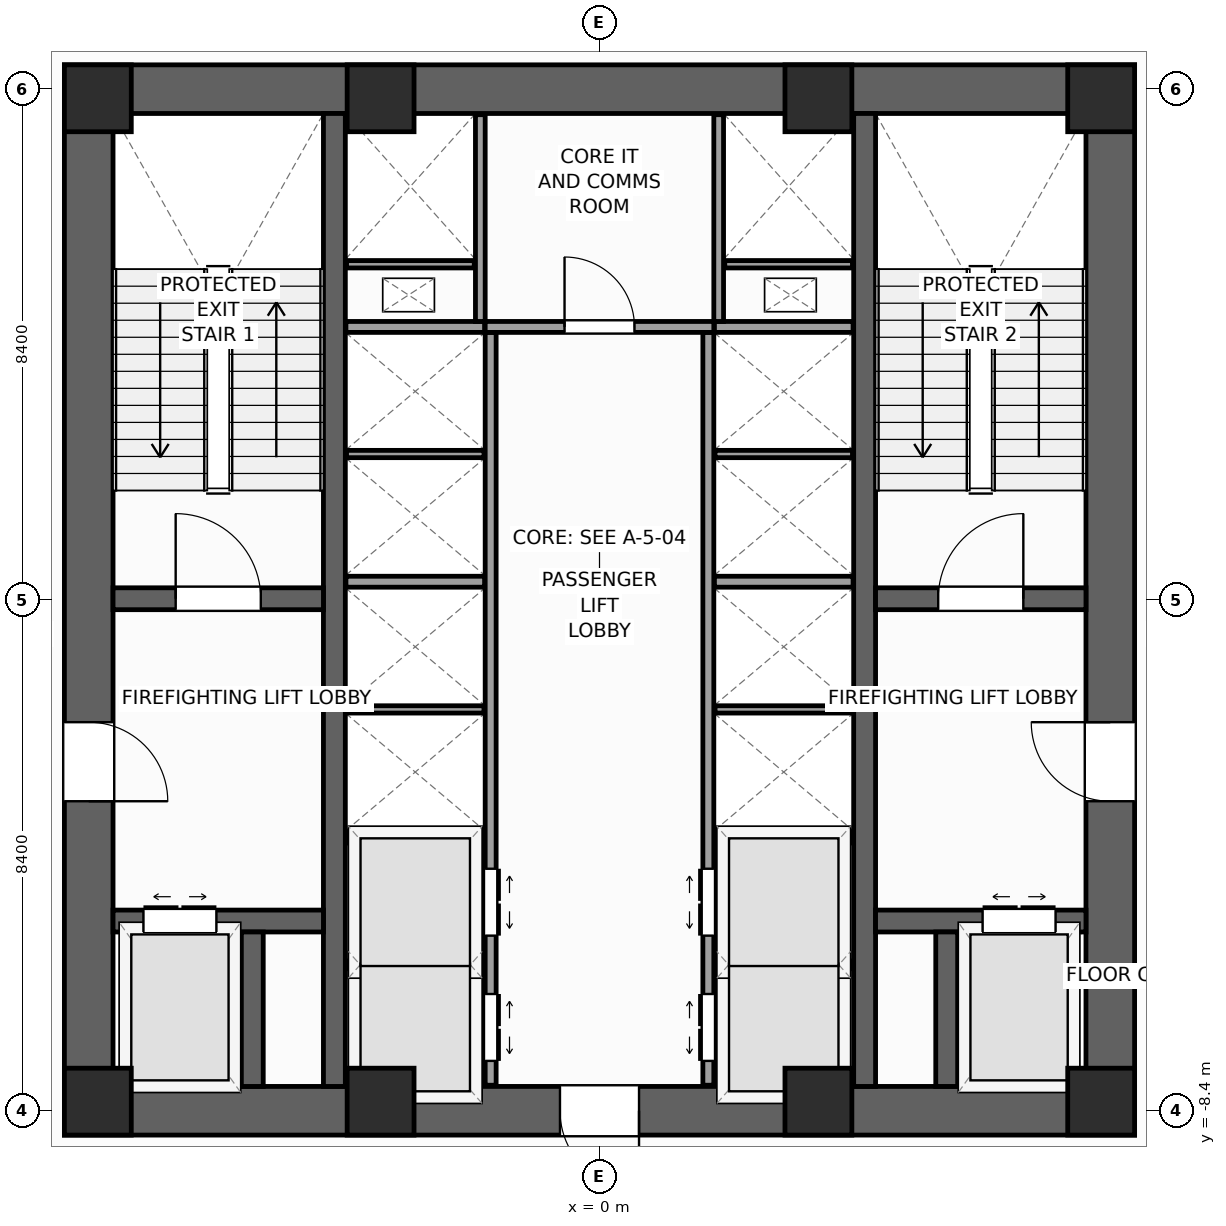
"""IFC4 building model, lengths in metres.
Left out: names, types, materials, properties, quantities, classifications, styles, units other than length and angle.
Written with IfcOpenShell. Run it as: python <this file> out.ifc"""

import sys

from ifc_helpers import new_model, si_unit, direction, frame, frame_2d, origin, origin_2d, place, context, subcontext, project, spatial, rectangle, extrude, source, transform, mapped, element, fill, save


model = new_model("IFC4")
c1 = context("Model", 3, precision=1e-05, world=origin(), true_north=direction((0.0, 1.0)))
c2 = subcontext(c1, "Body", "Model", "MODEL_VIEW")
j1 = project(units=[si_unit("LENGTHUNIT", "METRE"), si_unit("PLANEANGLEUNIT", "RADIAN")], contexts=[c1])
p1 = place(None, origin())
s1 = spatial("IfcSite", under=j1, at=p1, CompositionType="ELEMENT")
p2 = place(p1, origin())
s2 = spatial("IfcBuilding", under=s1, at=p2, CompositionType="ELEMENT")
p3 = place(p2, frame((0.0, 0.0, 6.0)))
s3 = spatial("IfcBuildingStorey", under=s2, at=p3, CompositionType="ELEMENT", Elevation=6.0)
p4 = place(p3, frame((-8.8, -8.4, 0.0), z_axis=(0.0, 0.0, 1.0), x_axis=(1.0, 0.0, 0.0)))
e1 = element("IfcWall", 1, at=p4, inside=s3, PredefinedType="SHEAR", context=c2, shape_type="SweptSolid", body=[
    extrude(rectangle(XDim=17.6, YDim=0.8, at=frame_2d((8.8, 0.0))), origin(), (0.0, 0.0, 1.0), 5.0),
])
p5 = place(p4, frame((8.15, 0.0, 0.0)))
e2 = element("IfcOpeningElement", 2, at=p5, cuts=e1, PredefinedType="OPENING", context=c2, shape_type="SweptSolid", body=[
    extrude(rectangle(XDim=1.3, YDim=2.2, at=frame_2d((0.65, 1.1))), frame((0.0, 0.41, 0.0), z_axis=(0.0, -1.0, 0.0), x_axis=(1.0, 0.0, 0.0)), (0.0, 0.0, 1.0), 0.82),
])
p6 = place(p3, frame((-8.8, 8.4, 0.0), z_axis=(0.0, 0.0, 1.0), x_axis=(1.0, 0.0, 0.0)))
e3 = element("IfcWall", 3, at=p6, inside=s3, PredefinedType="SHEAR", context=c2, shape_type="SweptSolid", body=[
    extrude(rectangle(XDim=17.6, YDim=0.8, at=frame_2d((8.8, 0.0))), origin(), (0.0, 0.0, 1.0), 5.0),
])
p7 = place(p3, frame((-8.4, -8.0, 0.0), z_axis=(0.0, 0.0, 1.0), x_axis=(0.0, 1.0, 0.0)))
e4 = element("IfcWall", 4, at=p7, inside=s3, PredefinedType="SHEAR", context=c2, shape_type="SweptSolid", body=[
    extrude(rectangle(XDim=16.0, YDim=0.8, at=frame_2d((8.0, 0.0))), origin(), (0.0, 0.0, 1.0), 5.0),
])
p8 = place(p7, frame((4.69, 0.0, 0.0)))
e5 = element("IfcOpeningElement", 5, at=p8, cuts=e4, PredefinedType="OPENING", context=c2, shape_type="SweptSolid", body=[
    extrude(rectangle(XDim=1.3, YDim=2.2, at=frame_2d((0.65, 1.1))), frame((0.0, 0.41, 0.0), z_axis=(0.0, -1.0, 0.0), x_axis=(1.0, 0.0, 0.0)), (0.0, 0.0, 1.0), 0.82),
])
p9 = place(p3, frame((8.4, -8.0, 0.0), z_axis=(0.0, 0.0, 1.0), x_axis=(0.0, 1.0, 0.0)))
e6 = element("IfcWall", 6, at=p9, inside=s3, PredefinedType="SHEAR", context=c2, shape_type="SweptSolid", body=[
    extrude(rectangle(XDim=16.0, YDim=0.8, at=frame_2d((8.0, 0.0))), origin(), (0.0, 0.0, 1.0), 5.0),
])
p10 = place(p9, frame((4.69, 0.0, 0.0)))
e7 = element("IfcOpeningElement", 7, at=p10, cuts=e6, PredefinedType="OPENING", context=c2, shape_type="SweptSolid", body=[
    extrude(rectangle(XDim=1.3, YDim=2.2, at=frame_2d((0.65, 1.1))), frame((0.0, 0.41, 0.0), z_axis=(0.0, -1.0, 0.0), x_axis=(1.0, 0.0, 0.0)), (0.0, 0.0, 1.0), 0.82),
])
for number, where, z_axis, x_axis in (
    (8, (-4.36, -8.0, 0.0), (0.0, 0.0, 1.0), (0.0, 1.0, 0.0)),
    (9, (4.36, -8.0, 0.0), (0.0, 0.0, 1.0), (0.0, 1.0, 0.0)),
):
    element("IfcWall", number, at=place(p3, frame(where, z_axis=z_axis, x_axis=x_axis)), inside=s3, PredefinedType="SHEAR", context=c2, shape_type="SweptSolid", body=[
        extrude(rectangle(XDim=16.0, YDim=0.36, at=frame_2d((8.0, 0.0))), origin(), (0.0, 0.0, 1.0), 5.0),
    ])
p11 = place(p3, frame((-8.0, 0.02, 0.0), z_axis=(0.0, 0.0, 1.0), x_axis=(1.0, 0.0, 0.0)))
e10 = element("IfcWall", 10, at=p11, inside=s3, PredefinedType="SHEAR", context=c2, shape_type="SweptSolid", body=[
    extrude(rectangle(XDim=3.46, YDim=0.36, at=frame_2d((1.73, 0.0))), origin(), (0.0, 0.0, 1.0), 5.0),
])
p12 = place(p11, frame((1.03, 0.0, 0.0)))
e11 = element("IfcOpeningElement", 11, at=p12, cuts=e10, PredefinedType="OPENING", context=c2, shape_type="SweptSolid", body=[
    extrude(rectangle(XDim=1.4, YDim=2.2, at=frame_2d((0.7, 1.1))), frame((0.0, 0.19, 0.0), z_axis=(0.0, -1.0, 0.0), x_axis=(1.0, 0.0, 0.0)), (0.0, 0.0, 1.0), 0.38),
])
p13 = place(p3, frame((4.54, 0.02, 0.0), z_axis=(0.0, 0.0, 1.0), x_axis=(1.0, 0.0, 0.0)))
e12 = element("IfcWall", 12, at=p13, inside=s3, PredefinedType="SHEAR", context=c2, shape_type="SweptSolid", body=[
    extrude(rectangle(XDim=3.46, YDim=0.36, at=frame_2d((1.73, 0.0))), origin(), (0.0, 0.0, 1.0), 5.0),
])
p14 = place(p13, frame((1.03, 0.0, 0.0)))
e13 = element("IfcOpeningElement", 13, at=p14, cuts=e12, PredefinedType="OPENING", context=c2, shape_type="SweptSolid", body=[
    extrude(rectangle(XDim=1.4, YDim=2.2, at=frame_2d((0.7, 1.1))), frame((0.0, 0.19, 0.0), z_axis=(0.0, -1.0, 0.0), x_axis=(1.0, 0.0, 0.0)), (0.0, 0.0, 1.0), 0.38),
])
p15 = place(p3, frame((-8.0, -5.28, 0.0), z_axis=(0.0, 0.0, 1.0), x_axis=(1.0, 0.0, 0.0)))
e14 = element("IfcWall", 14, at=p15, inside=s3, PredefinedType="SHEAR", context=c2, shape_type="SweptSolid", body=[
    extrude(rectangle(XDim=3.46, YDim=0.36, at=frame_2d((1.73, 0.0))), origin(), (0.0, 0.0, 1.0), 5.0),
])
p16 = place(p15, frame((0.5, 0.0, 0.0)))
e15 = element("IfcOpeningElement", 15, at=p16, cuts=e14, PredefinedType="OPENING", context=c2, shape_type="SweptSolid", body=[
    extrude(rectangle(XDim=1.2, YDim=2.25, at=frame_2d((0.6, 1.125))), frame((0.0, 0.19, 0.0), z_axis=(0.0, -1.0, 0.0), x_axis=(1.0, 0.0, 0.0)), (0.0, 0.0, 1.0), 0.38),
])
p17 = place(p3, frame((4.54, -5.28, 0.0), z_axis=(0.0, 0.0, 1.0), x_axis=(1.0, 0.0, 0.0)))
e16 = element("IfcWall", 16, at=p17, inside=s3, PredefinedType="SHEAR", context=c2, shape_type="SweptSolid", body=[
    extrude(rectangle(XDim=3.46, YDim=0.36, at=frame_2d((1.73, 0.0))), origin(), (0.0, 0.0, 1.0), 5.0),
])
p18 = place(p17, frame((1.76, 0.0, 0.0)))
e17 = element("IfcOpeningElement", 17, at=p18, cuts=e16, PredefinedType="OPENING", context=c2, shape_type="SweptSolid", body=[
    extrude(rectangle(XDim=1.2, YDim=2.25, at=frame_2d((0.6, 1.125))), frame((0.0, 0.19, 0.0), z_axis=(0.0, -1.0, 0.0), x_axis=(1.0, 0.0, 0.0)), (0.0, 0.0, 1.0), 0.38),
])
for number, where, z_axis, x_axis in (
    (18, (-5.71, -8.0, 0.0), (0.0, 0.0, 1.0), (0.0, 1.0, 0.0)),
    (19, (5.71, -8.0, 0.0), (0.0, 0.0, 1.0), (0.0, 1.0, 0.0)),
):
    element("IfcWall", number, at=place(p3, frame(where, z_axis=z_axis, x_axis=x_axis)), inside=s3, PredefinedType="SHEAR", context=c2, shape_type="SweptSolid", body=[
        extrude(rectangle(XDim=2.54, YDim=0.36, at=frame_2d((1.27, 0.0))), origin(), (0.0, 0.0, 1.0), 5.0),
    ])
m1 = source(origin(), c2, "Body", "SweptSolid", [
    extrude(rectangle(XDim=1.1, YDim=1.1, at=origin_2d()), origin(), (0.0, 0.0, 1.0), 5.0),
])
for number, where, z_axis, x_axis in (
    (20, (-8.25, -8.25, 0.0), (0.0, 0.0, 1.0), (1.0, 0.0, 0.0)),
    (21, (8.25, -8.25, 0.0), (0.0, 0.0, 1.0), (1.0, 0.0, 0.0)),
    (22, (8.25, 8.25, 0.0), (0.0, 0.0, 1.0), (1.0, 0.0, 0.0)),
    (23, (-8.25, 8.25, 0.0), (0.0, 0.0, 1.0), (1.0, 0.0, 0.0)),
    (24, (-3.6, -8.25, 0.0), (0.0, 0.0, 1.0), (1.0, 0.0, 0.0)),
    (25, (3.6, -8.25, 0.0), (0.0, 0.0, 1.0), (1.0, 0.0, 0.0)),
    (26, (-3.6, 8.25, 0.0), (0.0, 0.0, 1.0), (1.0, 0.0, 0.0)),
    (27, (3.6, 8.25, 0.0), (0.0, 0.0, 1.0), (1.0, 0.0, 0.0)),
):
    element("IfcColumn", number, at=place(p3, frame(where, z_axis=z_axis, x_axis=x_axis)), inside=s3, PredefinedType="PILASTER", context=c2, shape_type="MappedRepresentation", body=[
        mapped(m1, transform((0.0, 0.0, 0.0), scale=1.0)),
    ])
p19 = place(p3, frame((-1.79, -7.98, 0.0), z_axis=(0.0, 0.0, 1.0), x_axis=(0.0, 1.0, 0.0)))
e28 = element("IfcWall", 28, at=p19, inside=s3, PredefinedType="PARTITIONING", context=c2, shape_type="SweptSolid", body=[
    extrude(rectangle(XDim=12.38, YDim=0.18, at=frame_2d((6.19, 0.0))), origin(), (0.0, 0.0, 1.0), 4.66),
])
p20 = place(p19, frame((0.4, 0.0, 0.0)))
e29 = element("IfcOpeningElement", 29, at=p20, cuts=e28, PredefinedType="OPENING", context=c2, shape_type="SweptSolid", body=[
    extrude(rectangle(XDim=1.1, YDim=2.2, at=frame_2d((0.55, 1.1))), frame((0.0, 0.1, 0.0), z_axis=(0.0, -1.0, 0.0), x_axis=(1.0, 0.0, 0.0)), (0.0, 0.0, 1.0), 0.2),
])
p21 = place(p19, frame((2.46, 0.0, 0.0)))
e30 = element("IfcOpeningElement", 30, at=p21, cuts=e28, PredefinedType="OPENING", context=c2, shape_type="SweptSolid", body=[
    extrude(rectangle(XDim=1.1, YDim=2.2, at=frame_2d((0.55, 1.1))), frame((0.0, 0.1, 0.0), z_axis=(0.0, -1.0, 0.0), x_axis=(1.0, 0.0, 0.0)), (0.0, 0.0, 1.0), 0.2),
])
p22 = place(p3, frame((1.79, -7.98, 0.0), z_axis=(0.0, 0.0, 1.0), x_axis=(0.0, 1.0, 0.0)))
e31 = element("IfcWall", 31, at=p22, inside=s3, PredefinedType="PARTITIONING", context=c2, shape_type="SweptSolid", body=[
    extrude(rectangle(XDim=12.38, YDim=0.18, at=frame_2d((6.19, 0.0))), origin(), (0.0, 0.0, 1.0), 4.66),
])
p23 = place(p22, frame((0.4, 0.0, 0.0)))
e32 = element("IfcOpeningElement", 32, at=p23, cuts=e31, PredefinedType="OPENING", context=c2, shape_type="SweptSolid", body=[
    extrude(rectangle(XDim=1.1, YDim=2.2, at=frame_2d((0.55, 1.1))), frame((0.0, 0.1, 0.0), z_axis=(0.0, -1.0, 0.0), x_axis=(1.0, 0.0, 0.0)), (0.0, 0.0, 1.0), 0.2),
])
p24 = place(p22, frame((2.46, 0.0, 0.0)))
e33 = element("IfcOpeningElement", 33, at=p24, cuts=e31, PredefinedType="OPENING", context=c2, shape_type="SweptSolid", body=[
    extrude(rectangle(XDim=1.1, YDim=2.2, at=frame_2d((0.55, 1.1))), frame((0.0, 0.1, 0.0), z_axis=(0.0, -1.0, 0.0), x_axis=(1.0, 0.0, 0.0)), (0.0, 0.0, 1.0), 0.2),
])
p25 = place(p3, frame((-1.88, 4.49, 0.0), z_axis=(0.0, 0.0, 1.0), x_axis=(1.0, 0.0, 0.0)))
e34 = element("IfcWall", 34, at=p25, inside=s3, PredefinedType="PARTITIONING", context=c2, shape_type="SweptSolid", body=[
    extrude(rectangle(XDim=3.76, YDim=0.18, at=frame_2d((1.88, 0.0))), origin(), (0.0, 0.0, 1.0), 4.66),
])
p26 = place(p25, frame((1.305, 0.0, 0.0)))
e35 = element("IfcOpeningElement", 35, at=p26, cuts=e34, PredefinedType="OPENING", context=c2, shape_type="SweptSolid", body=[
    extrude(rectangle(XDim=1.15, YDim=2.25, at=frame_2d((0.575, 1.125))), frame((0.0, 0.1, 0.0), z_axis=(0.0, -1.0, 0.0), x_axis=(1.0, 0.0, 0.0)), (0.0, 0.0, 1.0), 0.2),
])
for number, where, z_axis, x_axis in (
    (36, (-4.17, -3.9, 0.0), (0.0, 0.0, 1.0), (1.0, 0.0, 0.0)),
    (37, (1.89, -3.9, 0.0), (0.0, 0.0, 1.0), (1.0, 0.0, 0.0)),
    (38, (-4.17, 0.3, 0.0), (0.0, 0.0, 1.0), (1.0, 0.0, 0.0)),
    (39, (1.89, 0.3, 0.0), (0.0, 0.0, 1.0), (1.0, 0.0, 0.0)),
    (40, (-4.17, 4.49, 0.0), (0.0, 0.0, 1.0), (1.0, 0.0, 0.0)),
    (41, (1.89, 4.49, 0.0), (0.0, 0.0, 1.0), (1.0, 0.0, 0.0)),
):
    element("IfcWall", number, at=place(p3, frame(where, z_axis=z_axis, x_axis=x_axis)), inside=s3, PredefinedType="PARTITIONING", context=c2, shape_type="SweptSolid", body=[
        extrude(rectangle(XDim=2.28, YDim=0.18, at=frame_2d((1.14, 0.0))), origin(), (0.0, 0.0, 1.0), 4.66),
    ])
for number, where, z_axis, x_axis in (
    (42, (-4.16, -6.0, 0.0), (0.0, 0.0, 1.0), (1.0, 0.0, 0.0)),
    (43, (1.9, -6.0, 0.0), (0.0, 0.0, 1.0), (1.0, 0.0, 0.0)),
    (44, (-4.16, -1.8, 0.0), (0.0, 0.0, 1.0), (1.0, 0.0, 0.0)),
    (45, (1.9, -1.8, 0.0), (0.0, 0.0, 1.0), (1.0, 0.0, 0.0)),
    (46, (-4.16, 2.4, 0.0), (0.0, 0.0, 1.0), (1.0, 0.0, 0.0)),
    (47, (1.9, 2.4, 0.0), (0.0, 0.0, 1.0), (1.0, 0.0, 0.0)),
):
    element("IfcWall", number, at=place(p3, frame(where, z_axis=z_axis, x_axis=x_axis)), inside=s3, PredefinedType="PARTITIONING", context=c2, shape_type="SweptSolid", body=[
        extrude(rectangle(XDim=2.26, YDim=0.12, at=frame_2d((1.13, 0.0))), origin(), (0.0, 0.0, 1.0), 4.66),
    ])
for number, where, z_axis, x_axis in (
    (48, (-1.96, 4.58, 0.0), (0.0, 0.0, 1.0), (0.0, 1.0, 0.0)),
    (49, (1.96, 4.58, 0.0), (0.0, 0.0, 1.0), (0.0, 1.0, 0.0)),
):
    element("IfcWall", number, at=place(p3, frame(where, z_axis=z_axis, x_axis=x_axis)), inside=s3, PredefinedType="PARTITIONING", context=c2, shape_type="SweptSolid", body=[
        extrude(rectangle(XDim=3.4, YDim=0.16, at=frame_2d((1.7, 0.0))), origin(), (0.0, 0.0, 1.0), 4.66),
    ])
for number, where, z_axis, x_axis in (
    (50, (-4.16, 5.52, 0.0), (0.0, 0.0, 1.0), (1.0, 0.0, 0.0)),
    (51, (2.06, 5.52, 0.0), (0.0, 0.0, 1.0), (1.0, 0.0, 0.0)),
):
    element("IfcWall", number, at=place(p3, frame(where, z_axis=z_axis, x_axis=x_axis)), inside=s3, PredefinedType="PARTITIONING", context=c2, shape_type="SweptSolid", body=[
        extrude(rectangle(XDim=2.1, YDim=0.12, at=frame_2d((1.05, 0.0))), origin(), (0.0, 0.0, 1.0), 4.66),
    ])
m2 = source(origin(), c2, "Body", "SweptSolid", [
    extrude(rectangle(XDim=1.4, YDim=2.2, at=frame_2d((0.7, 1.1))), frame((0.0, 0.025, 0.0), z_axis=(0.0, -1.0, 0.0), x_axis=(1.0, 0.0, 0.0)), (0.0, 0.0, 1.0), 0.05),
])
p27 = place(p12, origin())
e52 = element("IfcDoor", 52, at=p27, inside=s3, OperationType="SINGLE_SWING_LEFT", PredefinedType="DOOR", context=c2, shape_type="MappedRepresentation", body=[
    mapped(m2, transform((0.0, 0.0, 0.0), scale=1.0)),
])
fill(e11, e52)
p28 = place(p14, origin())
e53 = element("IfcDoor", 53, at=p28, inside=s3, OperationType="SINGLE_SWING_RIGHT", PredefinedType="DOOR", context=c2, shape_type="MappedRepresentation", body=[
    mapped(m2, transform((0.0, 0.0, 0.0), scale=1.0)),
])
fill(e13, e53)
m3 = source(origin(), c2, "Body", "SweptSolid", [
    extrude(rectangle(XDim=1.3, YDim=2.2, at=frame_2d((0.65, 1.1))), frame((0.0, 0.025, 0.0), z_axis=(0.0, -1.0, 0.0), x_axis=(1.0, 0.0, 0.0)), (0.0, 0.0, 1.0), 0.05),
])
p29 = place(p8, frame((1.3, 0.0, 0.0), z_axis=(0.0, 0.0, 1.0), x_axis=(-1.0, 0.0, 0.0)))
e54 = element("IfcDoor", 54, at=p29, inside=s3, OperationType="SINGLE_SWING_LEFT", PredefinedType="DOOR", context=c2, shape_type="MappedRepresentation", body=[
    mapped(m3, transform((0.0, 0.0, 0.0), scale=1.0)),
])
fill(e5, e54)
p30 = place(p10, origin())
e55 = element("IfcDoor", 55, at=p30, inside=s3, OperationType="SINGLE_SWING_RIGHT", PredefinedType="DOOR", context=c2, shape_type="MappedRepresentation", body=[
    mapped(m3, transform((0.0, 0.0, 0.0), scale=1.0)),
])
fill(e7, e55)
p31 = place(p5, frame((1.3, 0.0, 0.0), z_axis=(0.0, 0.0, 1.0), x_axis=(-1.0, 0.0, 0.0)))
e56 = element("IfcDoor", 56, at=p31, inside=s3, OperationType="SINGLE_SWING_RIGHT", PredefinedType="DOOR", context=c2, shape_type="MappedRepresentation", body=[
    mapped(m3, transform((0.0, 0.0, 0.0), scale=1.0)),
])
fill(e2, e56)
m4 = source(origin(), c2, "Body", "SweptSolid", [
    extrude(rectangle(XDim=1.2, YDim=2.25, at=frame_2d((0.6, 1.125))), frame((0.0, 0.025, 0.0), z_axis=(0.0, -1.0, 0.0), x_axis=(1.0, 0.0, 0.0)), (0.0, 0.0, 1.0), 0.05),
])
p32 = place(p16, origin())
e57 = element("IfcDoor", 57, at=p32, inside=s3, OperationType="DOUBLE_DOOR_SLIDING", PredefinedType="DOOR", context=c2, shape_type="MappedRepresentation", body=[
    mapped(m4, transform((0.0, 0.0, 0.0), scale=1.0)),
])
fill(e15, e57)
p33 = place(p18, origin())
e58 = element("IfcDoor", 58, at=p33, inside=s3, OperationType="DOUBLE_DOOR_SLIDING", PredefinedType="DOOR", context=c2, shape_type="MappedRepresentation", body=[
    mapped(m4, transform((0.0, 0.0, 0.0), scale=1.0)),
])
fill(e17, e58)
m5 = source(origin(), c2, "Body", "SweptSolid", [
    extrude(rectangle(XDim=1.1, YDim=2.2, at=frame_2d((0.55, 1.1))), frame((0.0, 0.025, 0.0), z_axis=(0.0, -1.0, 0.0), x_axis=(1.0, 0.0, 0.0)), (0.0, 0.0, 1.0), 0.05),
])
p34 = place(p20, frame((1.1, 0.0, 0.0), z_axis=(0.0, 0.0, 1.0), x_axis=(-1.0, 0.0, 0.0)))
e59 = element("IfcDoor", 59, at=p34, inside=s3, OperationType="DOUBLE_DOOR_SLIDING", PredefinedType="DOOR", context=c2, shape_type="MappedRepresentation", body=[
    mapped(m5, transform((0.0, 0.0, 0.0), scale=1.0)),
])
fill(e29, e59)
p35 = place(p21, frame((1.1, 0.0, 0.0), z_axis=(0.0, 0.0, 1.0), x_axis=(-1.0, 0.0, 0.0)))
e60 = element("IfcDoor", 60, at=p35, inside=s3, OperationType="DOUBLE_DOOR_SLIDING", PredefinedType="DOOR", context=c2, shape_type="MappedRepresentation", body=[
    mapped(m5, transform((0.0, 0.0, 0.0), scale=1.0)),
])
fill(e30, e60)
p36 = place(p23, origin())
e61 = element("IfcDoor", 61, at=p36, inside=s3, OperationType="DOUBLE_DOOR_SLIDING", PredefinedType="DOOR", context=c2, shape_type="MappedRepresentation", body=[
    mapped(m5, transform((0.0, 0.0, 0.0), scale=1.0)),
])
fill(e32, e61)
p37 = place(p24, origin())
e62 = element("IfcDoor", 62, at=p37, inside=s3, OperationType="DOUBLE_DOOR_SLIDING", PredefinedType="DOOR", context=c2, shape_type="MappedRepresentation", body=[
    mapped(m5, transform((0.0, 0.0, 0.0), scale=1.0)),
])
fill(e33, e62)
m6 = source(origin(), c2, "Body", "SweptSolid", [
    extrude(rectangle(XDim=1.15, YDim=2.25, at=frame_2d((0.575, 1.125))), frame((0.0, 0.025, 0.0), z_axis=(0.0, -1.0, 0.0), x_axis=(1.0, 0.0, 0.0)), (0.0, 0.0, 1.0), 0.05),
])
p38 = place(p26, origin())
e63 = element("IfcDoor", 63, at=p38, inside=s3, OperationType="SINGLE_SWING_LEFT", PredefinedType="DOOR", context=c2, shape_type="MappedRepresentation", body=[
    mapped(m6, transform((0.0, 0.0, 0.0), scale=1.0)),
])
fill(e35, e63)
save(model, sys.argv[1])
